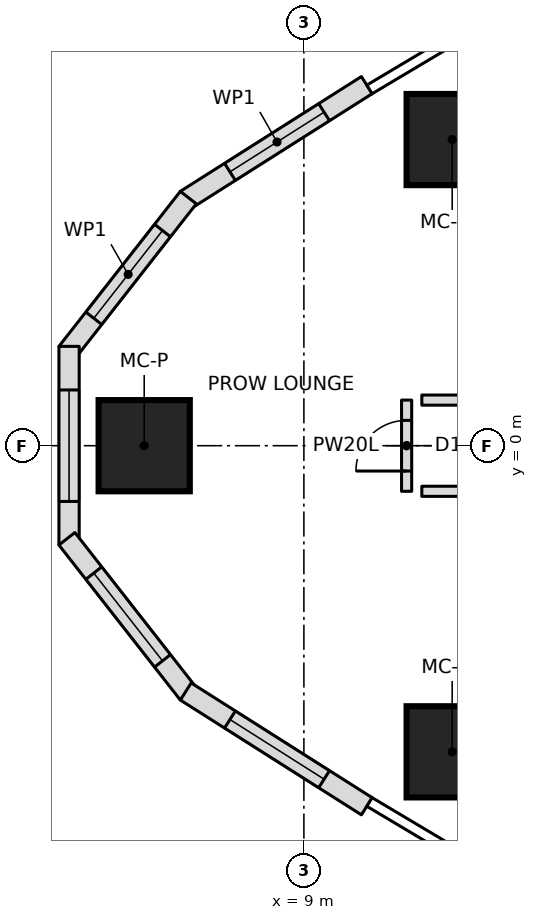
"""IFC4 building model, lengths in metres.
Left out: names, types, materials, properties, quantities, classifications, styles, units other than length and angle.
Written with IfcOpenShell. Run it as: python <this file> out.ifc"""

import sys

from ifc_helpers import new_model, si_unit, direction, frame, frame_2d, origin, origin_2d, place, context, subcontext, project, spatial, polyline, rectangle, outline, extrude, element, fill, save


model = new_model("IFC4")
c1 = context("Model", 3, precision=1e-05, world=origin(), true_north=direction((0.0, 1.0)))
c2 = subcontext(c1, "Body", "Model", "MODEL_VIEW")
j1 = project(units=[si_unit("LENGTHUNIT", "METRE"), si_unit("PLANEANGLEUNIT", "RADIAN")], contexts=[c1])
p1 = place(None, origin())
s1 = spatial("IfcSite", under=j1, at=p1, CompositionType="ELEMENT")
p2 = place(p1, origin())
s2 = spatial("IfcBuilding", under=s1, at=p2, CompositionType="ELEMENT")
p3 = place(p2, frame((0.0, 0.0, 71.55)))
s3 = spatial("IfcBuildingStorey", under=s2, at=p3, CompositionType="ELEMENT", Elevation=71.55)
for number, where, z_axis, x_axis in (
    (1, (5.848, 0.0, 0.0), (0.0, 0.0, 1.0), (1.0, 0.0, 0.0)),
    (2, (11.927, -6.042, 0.0), (0.0, 0.0, 1.0), (1.0, 0.0, 0.0)),
    (3, (11.927, 6.042, 0.0), (0.0, 0.0, 1.0), (1.0, 0.0, 0.0)),
):
    element("IfcColumn", number, at=place(p3, frame(where, z_axis=z_axis, x_axis=x_axis)), inside=s3, PredefinedType="COLUMN", context=c2, shape_type="SweptSolid", body=[
        extrude(rectangle(XDim=1.8, YDim=1.8, at=origin_2d()), origin(), (0.0, 0.0, 1.0), 3.55),
    ])
p4 = place(p3, frame((10.242, 7.116, 0.0), z_axis=(0.0, 0.0, 1.0), x_axis=(-0.844551578623, -0.535474211372, 0.0)))
e4 = element("IfcWall", 4, at=p4, inside=s3, PredefinedType="NOTDEFINED", context=c2, shape_type="SweptSolid", body=[
    extrude(outline(polyline([(0.0, -0.2), (4.23, -0.2), (4.162, 0.2), (0.0, 0.2), (0.0, -0.2)])), origin(), (0.0, 0.0, 1.0), 3.25),
])
p5 = place(p4, frame((0.998, 0.0, 0.6)))
e5 = element("IfcOpeningElement", 5, at=p5, cuts=e4, PredefinedType="OPENING", context=c2, shape_type="SweptSolid", body=[
    extrude(outline(polyline([(0.0, 1.35), (0.084, 1.771), (0.322, 2.128), (0.679, 2.366), (1.1, 2.45), (1.521, 2.366), (1.878, 2.128), (2.116, 1.771), (2.2, 1.35), (2.2, 1.1), (2.116, 0.679), (1.878, 0.322), (1.521, 0.084), (1.1, 0.0), (0.679, 0.084), (0.322, 0.322), (0.084, 0.679), (0.0, 1.1), (0.0, 1.35)])), frame((0.0, 0.21, 0.0), z_axis=(0.0, -1.0, 0.0), x_axis=(1.0, 0.0, 0.0)), (0.0, 0.0, 1.0), 0.42),
])
p6 = place(p3, frame((6.698, 4.87, 0.0), z_axis=(0.0, 0.0, 1.0), x_axis=(-0.616586647779, -0.787287054245, 0.0)))
e6 = element("IfcWall", 6, at=p6, inside=s3, PredefinedType="NOTDEFINED", context=c2, shape_type="SweptSolid", body=[
    extrude(outline(polyline([(-0.034, -0.2), (3.852, -0.2), (3.714, 0.2), (0.034, 0.2), (-0.034, -0.2)])), origin(), (0.0, 0.0, 1.0), 3.25),
])
p7 = place(p6, frame((0.792, 0.0, 0.6)))
e7 = element("IfcOpeningElement", 7, at=p7, cuts=e6, PredefinedType="OPENING", context=c2, shape_type="SweptSolid", body=[
    extrude(outline(polyline([(0.0, 1.35), (0.084, 1.771), (0.322, 2.128), (0.679, 2.366), (1.1, 2.45), (1.521, 2.366), (1.878, 2.128), (2.116, 1.771), (2.2, 1.35), (2.2, 1.1), (2.116, 0.679), (1.878, 0.322), (1.521, 0.084), (1.1, 0.0), (0.679, 0.084), (0.322, 0.322), (0.084, 0.679), (0.0, 1.1), (0.0, 1.35)])), frame((0.0, 0.21, 0.0), z_axis=(0.0, -1.0, 0.0), x_axis=(1.0, 0.0, 0.0)), (0.0, 0.0, 1.0), 0.42),
])
p8 = place(p3, frame((4.365, 1.891, 0.0), z_axis=(0.0, 0.0, 1.0), x_axis=(0.0, -1.0, 0.0)))
e8 = element("IfcWall", 8, at=p8, inside=s3, PredefinedType="NOTDEFINED", context=c2, shape_type="SweptSolid", body=[
    extrude(outline(polyline([(-0.069, -0.2), (3.852, -0.2), (3.714, 0.2), (0.069, 0.2), (-0.069, -0.2)])), origin(), (0.0, 0.0, 1.0), 3.25),
])
p9 = place(p8, frame((0.792, 0.0, 0.6)))
e9 = element("IfcOpeningElement", 9, at=p9, cuts=e8, PredefinedType="OPENING", context=c2, shape_type="SweptSolid", body=[
    extrude(outline(polyline([(0.0, 1.35), (0.084, 1.771), (0.322, 2.128), (0.679, 2.366), (1.1, 2.45), (1.521, 2.366), (1.878, 2.128), (2.116, 1.771), (2.2, 1.35), (2.2, 1.1), (2.116, 0.679), (1.878, 0.322), (1.521, 0.084), (1.1, 0.0), (0.679, 0.084), (0.322, 0.322), (0.084, 0.679), (0.0, 1.1), (0.0, 1.35)])), frame((0.0, 0.21, 0.0), z_axis=(0.0, -1.0, 0.0), x_axis=(1.0, 0.0, 0.0)), (0.0, 0.0, 1.0), 0.42),
])
p10 = place(p3, frame((4.365, -1.891, 0.0), z_axis=(0.0, 0.0, 1.0), x_axis=(0.616586647779, -0.787287054245, 0.0)))
e10 = element("IfcWall", 10, at=p10, inside=s3, PredefinedType="NOTDEFINED", context=c2, shape_type="SweptSolid", body=[
    extrude(outline(polyline([(-0.069, -0.2), (3.817, -0.2), (3.749, 0.2), (0.069, 0.2), (-0.069, -0.2)])), origin(), (0.0, 0.0, 1.0), 3.25),
])
p11 = place(p10, frame((0.792, 0.0, 0.6)))
e11 = element("IfcOpeningElement", 11, at=p11, cuts=e10, PredefinedType="OPENING", context=c2, shape_type="SweptSolid", body=[
    extrude(outline(polyline([(0.0, 1.35), (0.084, 1.771), (0.322, 2.128), (0.679, 2.366), (1.1, 2.45), (1.521, 2.366), (1.878, 2.128), (2.116, 1.771), (2.2, 1.35), (2.2, 1.1), (2.116, 0.679), (1.878, 0.322), (1.521, 0.084), (1.1, 0.0), (0.679, 0.084), (0.322, 0.322), (0.084, 0.679), (0.0, 1.1), (0.0, 1.35)])), frame((0.0, 0.21, 0.0), z_axis=(0.0, -1.0, 0.0), x_axis=(1.0, 0.0, 0.0)), (0.0, 0.0, 1.0), 0.42),
])
p12 = place(p3, frame((6.698, -4.87, 0.0), z_axis=(0.0, 0.0, 1.0), x_axis=(0.844551578623, -0.535474211372, 0.0)))
e12 = element("IfcWall", 12, at=p12, inside=s3, PredefinedType="NOTDEFINED", context=c2, shape_type="SweptSolid", body=[
    extrude(outline(polyline([(-0.034, -0.2), (4.196, -0.2), (4.196, 0.2), (0.034, 0.2), (-0.034, -0.2)])), origin(), (0.0, 0.0, 1.0), 3.25),
])
p13 = place(p12, frame((0.998, 0.0, 0.6)))
e13 = element("IfcOpeningElement", 13, at=p13, cuts=e12, PredefinedType="OPENING", context=c2, shape_type="SweptSolid", body=[
    extrude(outline(polyline([(0.0, 1.35), (0.084, 1.771), (0.322, 2.128), (0.679, 2.366), (1.1, 2.45), (1.521, 2.366), (1.878, 2.128), (2.116, 1.771), (2.2, 1.35), (2.2, 1.1), (2.116, 0.679), (1.878, 0.322), (1.521, 0.084), (1.1, 0.0), (0.679, 0.084), (0.322, 0.322), (0.084, 0.679), (0.0, 1.1), (0.0, 1.35)])), frame((0.0, 0.21, 0.0), z_axis=(0.0, -1.0, 0.0), x_axis=(1.0, 0.0, 0.0)), (0.0, 0.0, 1.0), 0.42),
])
p14 = place(p3, frame((11.027, -0.9, 0.0), z_axis=(0.0, 0.0, 1.0), x_axis=(0.0, 1.0, 0.0)))
e14 = element("IfcWall", 14, at=p14, inside=s3, PredefinedType="PARTITIONING", context=c2, shape_type="SweptSolid", body=[
    extrude(rectangle(XDim=1.8, YDim=0.2, at=frame_2d((0.9, 0.0))), origin(), (0.0, 0.0, 1.0), 3.15),
])
p15 = place(p14, frame((0.4, 0.0, 0.0)))
e15 = element("IfcOpeningElement", 15, at=p15, cuts=e14, PredefinedType="OPENING", context=c2, shape_type="SweptSolid", body=[
    extrude(rectangle(XDim=1.0, YDim=2.1, at=frame_2d((0.5, 1.05))), frame((0.0, 0.11, 0.0), z_axis=(0.0, -1.0, 0.0), x_axis=(1.0, 0.0, 0.0)), (0.0, 0.0, 1.0), 0.22),
])
p16 = place(p3, frame((11.327, 0.9, 0.0), z_axis=(0.0, 0.0, 1.0), x_axis=(1.0, 0.0, 0.0)))
e16 = element("IfcWall", 16, at=p16, inside=s3, PredefinedType="PARTITIONING", context=c2, shape_type="SweptSolid", body=[
    extrude(rectangle(XDim=2.323, YDim=0.2, at=frame_2d((1.161, 0.0))), origin(), (0.0, 0.0, 1.0), 3.15),
])
p17 = place(p16, frame((0.995, 0.0, 0.0)))
e17 = element("IfcOpeningElement", 17, at=p17, cuts=e16, PredefinedType="OPENING", context=c2, shape_type="SweptSolid", body=[
    extrude(rectangle(XDim=1.0, YDim=2.1, at=frame_2d((0.5, 1.05))), frame((0.0, 0.11, 0.0), z_axis=(0.0, -1.0, 0.0), x_axis=(1.0, 0.0, 0.0)), (0.0, 0.0, 1.0), 0.22),
])
p18 = place(p3, frame((11.327, -0.9, 0.0), z_axis=(0.0, 0.0, 1.0), x_axis=(1.0, 0.0, 0.0)))
e18 = element("IfcWall", 18, at=p18, inside=s3, PredefinedType="PARTITIONING", context=c2, shape_type="SweptSolid", body=[
    extrude(rectangle(XDim=2.323, YDim=0.2, at=frame_2d((1.161, 0.0))), origin(), (0.0, 0.0, 1.0), 3.15),
])
p19 = place(p18, frame((0.995, 0.0, 0.0)))
e19 = element("IfcOpeningElement", 19, at=p19, cuts=e18, PredefinedType="OPENING", context=c2, shape_type="SweptSolid", body=[
    extrude(rectangle(XDim=1.0, YDim=2.1, at=frame_2d((0.5, 1.05))), frame((0.0, 0.11, 0.0), z_axis=(0.0, -1.0, 0.0), x_axis=(1.0, 0.0, 0.0)), (0.0, 0.0, 1.0), 0.22),
])
p20 = place(p5, origin())
e20 = element("IfcWindow", 20, at=p20, inside=s3, PartitioningType="SINGLE_PANEL", PredefinedType="WINDOW", context=c2, shape_type="SweptSolid", body=[
    extrude(outline(polyline([(0.0, 1.35), (0.084, 1.771), (0.322, 2.128), (0.679, 2.366), (1.1, 2.45), (1.521, 2.366), (1.878, 2.128), (2.116, 1.771), (2.2, 1.35), (2.2, 1.1), (2.116, 0.679), (1.878, 0.322), (1.521, 0.084), (1.1, 0.0), (0.679, 0.084), (0.322, 0.322), (0.084, 0.679), (0.0, 1.1), (0.0, 1.35)])), frame((0.0, 0.17, 0.0), z_axis=(0.0, -1.0, 0.0), x_axis=(1.0, 0.0, 0.0)), (0.0, 0.0, 1.0), 0.06),
])
fill(e5, e20)
p21 = place(p7, origin())
e21 = element("IfcWindow", 21, at=p21, inside=s3, PartitioningType="SINGLE_PANEL", PredefinedType="WINDOW", context=c2, shape_type="SweptSolid", body=[
    extrude(outline(polyline([(0.0, 1.35), (0.084, 1.771), (0.322, 2.128), (0.679, 2.366), (1.1, 2.45), (1.521, 2.366), (1.878, 2.128), (2.116, 1.771), (2.2, 1.35), (2.2, 1.1), (2.116, 0.679), (1.878, 0.322), (1.521, 0.084), (1.1, 0.0), (0.679, 0.084), (0.322, 0.322), (0.084, 0.679), (0.0, 1.1), (0.0, 1.35)])), frame((0.0, 0.17, 0.0), z_axis=(0.0, -1.0, 0.0), x_axis=(1.0, 0.0, 0.0)), (0.0, 0.0, 1.0), 0.06),
])
fill(e7, e21)
p22 = place(p9, origin())
e22 = element("IfcWindow", 22, at=p22, inside=s3, PartitioningType="SINGLE_PANEL", PredefinedType="WINDOW", context=c2, shape_type="SweptSolid", body=[
    extrude(outline(polyline([(0.0, 1.35), (0.084, 1.771), (0.322, 2.128), (0.679, 2.366), (1.1, 2.45), (1.521, 2.366), (1.878, 2.128), (2.116, 1.771), (2.2, 1.35), (2.2, 1.1), (2.116, 0.679), (1.878, 0.322), (1.521, 0.084), (1.1, 0.0), (0.679, 0.084), (0.322, 0.322), (0.084, 0.679), (0.0, 1.1), (0.0, 1.35)])), frame((0.0, 0.17, 0.0), z_axis=(0.0, -1.0, 0.0), x_axis=(1.0, 0.0, 0.0)), (0.0, 0.0, 1.0), 0.06),
])
fill(e9, e22)
p23 = place(p11, origin())
e23 = element("IfcWindow", 23, at=p23, inside=s3, PartitioningType="SINGLE_PANEL", PredefinedType="WINDOW", context=c2, shape_type="SweptSolid", body=[
    extrude(outline(polyline([(0.0, 1.35), (0.084, 1.771), (0.322, 2.128), (0.679, 2.366), (1.1, 2.45), (1.521, 2.366), (1.878, 2.128), (2.116, 1.771), (2.2, 1.35), (2.2, 1.1), (2.116, 0.679), (1.878, 0.322), (1.521, 0.084), (1.1, 0.0), (0.679, 0.084), (0.322, 0.322), (0.084, 0.679), (0.0, 1.1), (0.0, 1.35)])), frame((0.0, 0.17, 0.0), z_axis=(0.0, -1.0, 0.0), x_axis=(1.0, 0.0, 0.0)), (0.0, 0.0, 1.0), 0.06),
])
fill(e11, e23)
p24 = place(p13, origin())
e24 = element("IfcWindow", 24, at=p24, inside=s3, PartitioningType="SINGLE_PANEL", PredefinedType="WINDOW", context=c2, shape_type="SweptSolid", body=[
    extrude(outline(polyline([(0.0, 1.35), (0.084, 1.771), (0.322, 2.128), (0.679, 2.366), (1.1, 2.45), (1.521, 2.366), (1.878, 2.128), (2.116, 1.771), (2.2, 1.35), (2.2, 1.1), (2.116, 0.679), (1.878, 0.322), (1.521, 0.084), (1.1, 0.0), (0.679, 0.084), (0.322, 0.322), (0.084, 0.679), (0.0, 1.1), (0.0, 1.35)])), frame((0.0, 0.17, 0.0), z_axis=(0.0, -1.0, 0.0), x_axis=(1.0, 0.0, 0.0)), (0.0, 0.0, 1.0), 0.06),
])
fill(e13, e24)
p25 = place(p15, origin())
e25 = element("IfcDoor", 25, at=p25, inside=s3, OperationType="SINGLE_SWING_LEFT", PredefinedType="DOOR", context=c2, shape_type="SweptSolid", body=[
    extrude(rectangle(XDim=1.0, YDim=2.1, at=frame_2d((0.5, 1.05))), frame((0.0, 0.025, 0.0), z_axis=(0.0, -1.0, 0.0), x_axis=(1.0, 0.0, 0.0)), (0.0, 0.0, 1.0), 0.05),
])
fill(e15, e25)
save(model, sys.argv[1])
